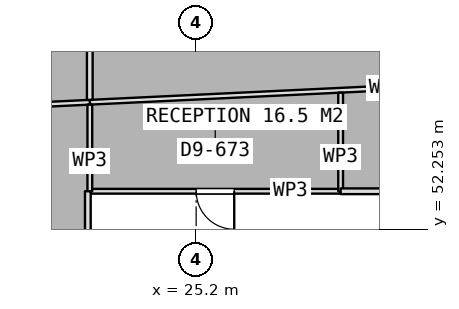
"""IFC4 building model, lengths in metres.
Left out: names, types, materials, properties, quantities, classifications, styles, units other than length and angle.
Written with IfcOpenShell. Run it as: python <this file> out.ifc"""

import sys

from ifc_helpers import new_model, si_unit, direction, frame, frame_2d, origin, place, context, subcontext, project, spatial, rectangle, extrude, element, fill, save


model = new_model("IFC4")
c1 = context("Model", 3, precision=1e-05, world=origin(), true_north=direction((0.0, 1.0)))
c2 = subcontext(c1, "Body", "Model", "MODEL_VIEW")
j1 = project(units=[si_unit("LENGTHUNIT", "METRE"), si_unit("PLANEANGLEUNIT", "RADIAN")], contexts=[c1])
p1 = place(None, origin())
s1 = spatial("IfcSite", under=j1, at=p1, CompositionType="ELEMENT")
p2 = place(p1, origin())
s2 = spatial("IfcBuilding", under=s1, at=p2, CompositionType="ELEMENT")
p3 = place(p2, frame((0.0, 0.0, 168.2)))
s3 = spatial("IfcBuildingStorey", under=s2, at=p3, CompositionType="ELEMENT", Elevation=168.2)
p4 = place(p3, frame((32.15, 56.058, 0.0), z_axis=(0.0, 0.0, 1.0), x_axis=(-0.998858721721, -0.047762475259, 0.0)))
e1 = element("IfcWall", 1, at=p4, inside=s3, PredefinedType="PARTITIONING", context=c2, shape_type="SweptSolid", body=[
    extrude(rectangle(XDim=9.758, YDim=0.125, at=frame_2d((4.879, 0.0))), origin(), (0.0, 0.0, 1.0), 4.25),
])
p5 = place(p3, frame((22.403, 55.592, 0.0), z_axis=(0.0, 0.0, 1.0), x_axis=(-0.998856898281, -0.047800593685, 0.0)))
e2 = element("IfcWall", 2, at=p5, inside=s3, PredefinedType="PARTITIONING", context=c2, shape_type="SweptSolid", body=[
    extrude(rectangle(XDim=7.094, YDim=0.125, at=frame_2d((3.547, 0.0))), origin(), (0.0, 0.0, 1.0), 4.25),
])
p6 = place(p5, frame((3.047, 0.0, 0.0)))
e3 = element("IfcOpeningElement", 3, at=p6, cuts=e2, PredefinedType="OPENING", context=c2, shape_type="SweptSolid", body=[
    extrude(rectangle(XDim=1.0, YDim=2.1, at=frame_2d((0.5, 1.05))), frame((0.0, 0.073, 0.0), z_axis=(0.0, -1.0, 0.0), x_axis=(1.0, 0.0, 0.0)), (0.0, 0.0, 1.0), 0.145),
])
p7 = place(p3, frame((29.002, 53.25, 0.0), z_axis=(0.0, 0.0, 1.0), x_axis=(-1.0, 0.0, 0.0)))
e4 = element("IfcWall", 4, at=p7, inside=s3, PredefinedType="PARTITIONING", context=c2, shape_type="SweptSolid", body=[
    extrude(rectangle(XDim=6.6, YDim=0.125, at=frame_2d((3.3, 0.0))), origin(), (0.0, 0.0, 1.0), 4.25),
])
p8 = place(p7, frame((2.8, 0.0, 0.0)))
e5 = element("IfcOpeningElement", 5, at=p8, cuts=e4, PredefinedType="OPENING", context=c2, shape_type="SweptSolid", body=[
    extrude(rectangle(XDim=1.0, YDim=2.1, at=frame_2d((0.5, 1.05))), frame((0.0, 0.073, 0.0), z_axis=(0.0, -1.0, 0.0), x_axis=(1.0, 0.0, 0.0)), (0.0, 0.0, 1.0), 0.145),
])
p9 = place(p3, frame((22.402, 53.25, 0.0), z_axis=(0.0, 0.0, 1.0), x_axis=(0.0, 1.0, 0.0)))
e6 = element("IfcWall", 6, at=p9, inside=s3, PredefinedType="PARTITIONING", context=c2, shape_type="SweptSolid", body=[
    extrude(rectangle(XDim=2.279, YDim=0.125, at=frame_2d((1.14, 0.0))), origin(), (0.0, 0.0, 1.0), 4.25),
])
p10 = place(p3, frame((29.002, 55.845, 0.0), z_axis=(0.0, 0.0, 1.0), x_axis=(0.0, -1.0, 0.0)))
e7 = element("IfcWall", 7, at=p10, inside=s3, PredefinedType="PARTITIONING", context=c2, shape_type="SweptSolid", body=[
    extrude(rectangle(XDim=2.595, YDim=0.125, at=frame_2d((1.297, 0.0))), origin(), (0.0, 0.0, 1.0), 4.25),
])
p11 = place(p3, frame((53.25, 53.25, 0.0), z_axis=(0.0, 0.0, 1.0), x_axis=(-1.0, 0.0, 0.0)))
e8 = element("IfcWall", 8, at=p11, inside=s3, PredefinedType="PARTITIONING", context=c2, shape_type="SweptSolid", body=[
    extrude(rectangle(XDim=24.248, YDim=0.15, at=frame_2d((12.124, 0.0))), origin(), (0.0, 0.0, 1.0), 4.25),
])
p12 = place(p3, frame((22.401, 55.654, 0.0), z_axis=(0.0, 0.0, 1.0), x_axis=(0.0, 1.0, 0.0)))
e9 = element("IfcWall", 9, at=p12, inside=s3, PredefinedType="PARTITIONING", context=c2, shape_type="SweptSolid", body=[
    extrude(rectangle(XDim=5.294, YDim=0.15, at=frame_2d((2.647, 0.0))), origin(), (0.0, 0.0, 1.0), 4.25),
])
p13 = place(p3, frame((22.35, 53.25, 0.0), z_axis=(0.0, 0.0, 1.0), x_axis=(0.0, -1.0, 0.0)))
e10 = element("IfcWall", 10, at=p13, inside=s3, PredefinedType="PARTITIONING", context=c2, shape_type="SweptSolid", body=[
    extrude(rectangle(XDim=19.804, YDim=0.15, at=frame_2d((9.902, 0.0))), origin(), (0.0, 0.0, 1.0), 4.25),
])
p14 = place(p13, frame((9.402, 0.0, 0.0)))
e11 = element("IfcOpeningElement", 11, at=p14, cuts=e10, PredefinedType="OPENING", context=c2, shape_type="SweptSolid", body=[
    extrude(rectangle(XDim=1.0, YDim=2.1, at=frame_2d((0.5, 1.05))), frame((0.0, 0.085, 0.0), z_axis=(0.0, -1.0, 0.0), x_axis=(1.0, 0.0, 0.0)), (0.0, 0.0, 1.0), 0.17),
])
p15 = place(p8, origin())
e12 = element("IfcDoor", 12, at=p15, inside=s3, OperationType="SINGLE_SWING_LEFT", PredefinedType="DOOR", context=c2, shape_type="SweptSolid", body=[
    extrude(rectangle(XDim=1.0, YDim=2.1, at=frame_2d((0.5, 1.05))), frame((0.0, 0.025, 0.0), z_axis=(0.0, -1.0, 0.0), x_axis=(1.0, 0.0, 0.0)), (0.0, 0.0, 1.0), 0.05),
])
fill(e5, e12)
save(model, sys.argv[1])
